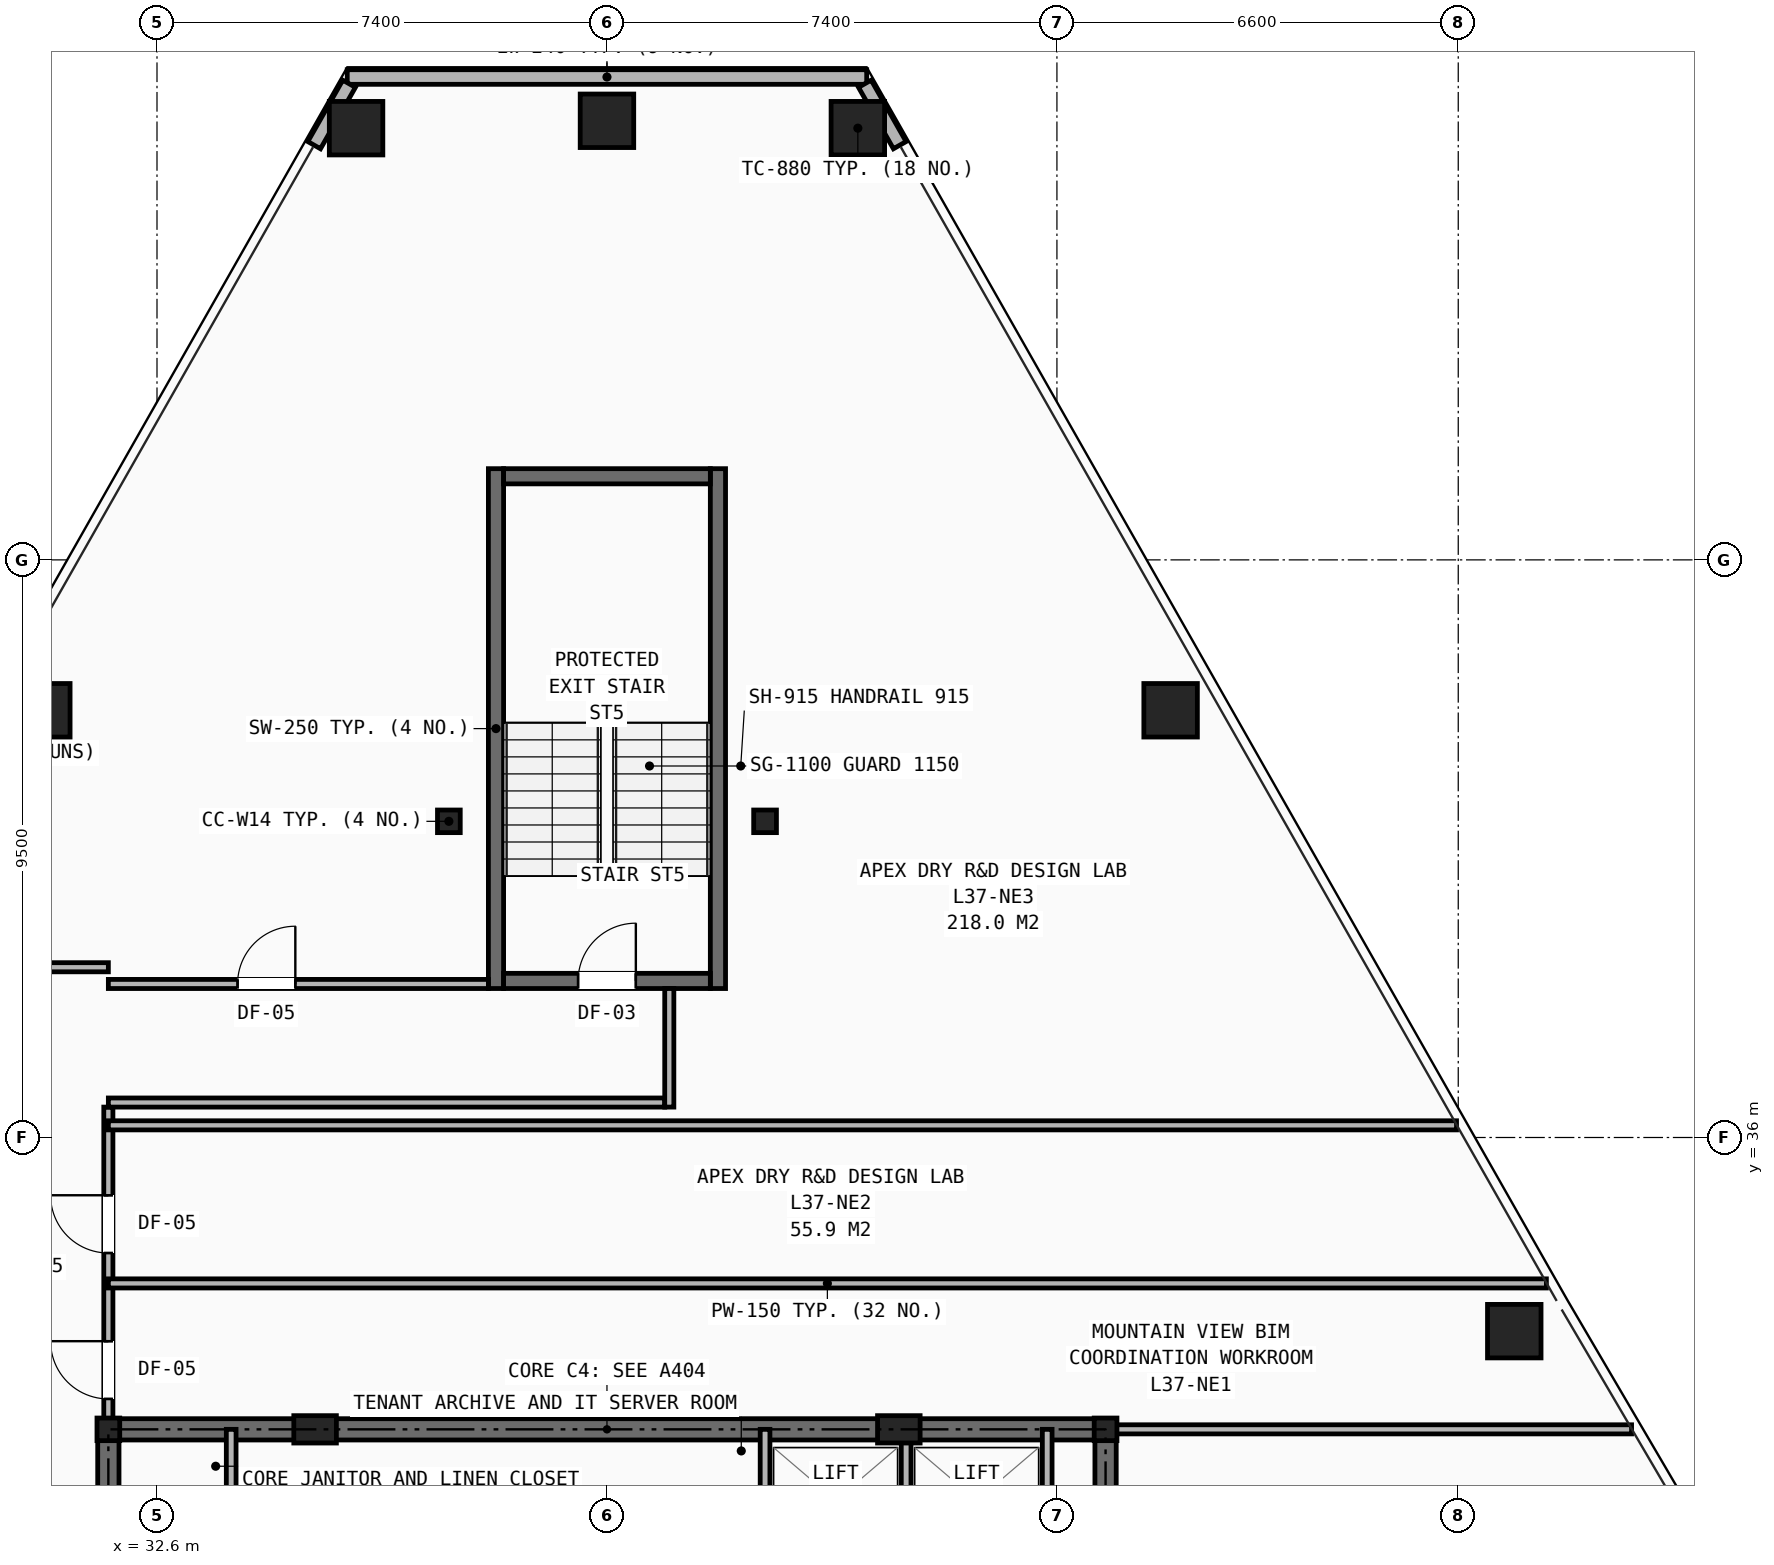
"""IFC4 building model, lengths in metres.
Left out: names, types, materials, properties, quantities, classifications, styles, units other than length and angle.
Written with IfcOpenShell. Run it as: python <this file> out.ifc"""

import sys

from ifc_helpers import new_model, si_unit, direction, frame, frame_2d, origin, origin_2d, place, context, subcontext, project, spatial, rectangle, hollow_rectangle, i_section, extrude, element, fill, save


model = new_model("IFC4")
c1 = context("Model", 3, precision=1e-05, world=origin(), true_north=direction((0.0, 1.0)))
c2 = subcontext(c1, "Body", "Model", "MODEL_VIEW")
j1 = project(units=[si_unit("LENGTHUNIT", "METRE"), si_unit("PLANEANGLEUNIT", "RADIAN")], contexts=[c1])
p1 = place(None, origin())
s1 = spatial("IfcSite", under=j1, at=p1, CompositionType="ELEMENT")
p2 = place(p1, origin())
s2 = spatial("IfcBuilding", under=s1, at=p2, CompositionType="ELEMENT")
p3 = place(p2, frame((0.0, 0.0, 129.8)))
s3 = spatial("IfcBuildingStorey", under=s2, at=p3, CompositionType="ELEMENT", Elevation=129.8)
for number, where, z_axis, x_axis in (
    (1, (31.8, 31.2, 0.0), (0.0, 0.0, 1.0), (1.0, 0.0, 0.0)),
    (2, (48.2, 31.2, 0.0), (0.0, 0.0, 1.0), (1.0, 0.0, 0.0)),
    (3, (37.4, 41.2, 0.0), (0.0, 0.0, 1.0), (1.0, 0.0, 0.0)),
    (4, (42.6, 41.2, 0.0), (0.0, 0.0, 1.0), (1.0, 0.0, 0.0)),
):
    element("IfcColumn", number, at=place(p3, frame(where, z_axis=z_axis, x_axis=x_axis)), inside=s3, PredefinedType="COLUMN", context=c2, shape_type="SweptSolid", body=[
        extrude(i_section(OverallWidth=0.374, OverallDepth=0.372, WebThickness=0.016, FlangeThickness=0.026, at=origin_2d()), origin(), (0.0, 0.0, 1.0), 3.45),
    ])
for number, where, z_axis, x_axis in (
    (5, (35.2, 31.2, 0.0), (0.0, 0.0, 1.0), (1.0, 0.0, 0.0)),
    (6, (44.8, 31.2, 0.0), (0.0, 0.0, 1.0), (1.0, 0.0, 0.0)),
):
    element("IfcColumn", number, at=place(p3, frame(where, z_axis=z_axis, x_axis=x_axis)), inside=s3, PredefinedType="PILASTER", context=c2, shape_type="SweptSolid", body=[
        extrude(rectangle(XDim=0.7, YDim=0.45, at=origin_2d()), origin(), (0.0, 0.0, 1.0), 3.45),
    ])
for number, where, z_axis, x_axis in (
    (7, (44.126, 52.6, 0.0), (0.0, 0.0, 1.0), (1.0, 0.0, 0.0)),
    (8, (40.0, 52.722, 0.0), (0.0, 0.0, 1.0), (1.0, 0.0, 0.0)),
    (9, (35.874, 52.6, 0.0), (0.0, 0.0, 1.0), (1.0, 0.0, 0.0)),
    (10, (30.73, 43.026, 0.0), (0.0, 0.0, 1.0), (1.0, 0.0, 0.0)),
    (11, (54.921, 32.815, 0.0), (0.0, 0.0, 1.0), (1.0, 0.0, 0.0)),
    (12, (49.27, 43.026, 0.0), (0.0, 0.0, 1.0), (1.0, 0.0, 0.0)),
):
    element("IfcColumn", number, at=place(p3, frame(where, z_axis=z_axis, x_axis=x_axis)), inside=s3, PredefinedType="COLUMN", context=c2, shape_type="SweptSolid", body=[
        extrude(hollow_rectangle(XDim=0.88, YDim=0.88, WallThickness=0.06, at=origin_2d()), origin(), (0.0, 0.0, 1.0), 3.45),
    ])
p4 = place(p3, frame((35.729, 53.442, 0.0), z_axis=(0.0, 0.0, 1.0), x_axis=(1.0, 0.0, 0.0)))
e13 = element("IfcWall", 13, at=p4, inside=s3, PredefinedType="SHEAR", context=c2, shape_type="SweptSolid", body=[
    extrude(rectangle(XDim=8.543, YDim=0.24, at=frame_2d((4.271, 0.0))), origin(), (0.0, 0.0, 1.0), 2.583),
])
for number, where, z_axis, x_axis in (
    (14, (35.759, 53.331, 0.0), (0.0, 0.0, 1.0), (-0.494, -0.869, 0.0)),
    (15, (44.815, 52.321, 0.0), (0.0, 0.0, 1.0), (-0.494, 0.869, 0.0)),
):
    element("IfcWall", number, at=place(p3, frame(where, z_axis=z_axis, x_axis=x_axis)), inside=s3, PredefinedType="SHEAR", context=c2, shape_type="SweptSolid", body=[
        extrude(rectangle(XDim=1.162, YDim=0.24, at=frame_2d((0.581, 0.0))), origin(), (0.0, 0.0, 1.0), 2.583),
    ])
p5 = place(p3, frame((31.8, 31.2, 0.0), z_axis=(0.0, 0.0, 1.0), x_axis=(1.0, 0.0, 0.0)))
e16 = element("IfcWall", 16, at=p5, inside=s3, PredefinedType="SHEAR", context=c2, shape_type="SweptSolid", body=[
    extrude(rectangle(XDim=16.4, YDim=0.35, at=frame_2d((8.2, 0.0))), origin(), (0.0, 0.0, 1.0), 3.21),
])
p6 = place(p3, frame((31.8, 16.4, 0.0), z_axis=(0.0, 0.0, 1.0), x_axis=(0.0, 1.0, 0.0)))
e17 = element("IfcWall", 17, at=p6, inside=s3, PredefinedType="SHEAR", context=c2, shape_type="SweptSolid", body=[
    extrude(rectangle(XDim=14.8, YDim=0.35, at=frame_2d((7.4, 0.0))), origin(), (0.0, 0.0, 1.0), 3.21),
])
p7 = place(p6, frame((11.0, 0.0, 0.0)))
e18 = element("IfcOpeningElement", 18, at=p7, cuts=e17, PredefinedType="OPENING", context=c2, shape_type="SweptSolid", body=[
    extrude(rectangle(XDim=1.1, YDim=2.15, at=frame_2d((0.55, 1.075))), frame((0.0, 0.185, 0.0), z_axis=(0.0, -1.0, 0.0), x_axis=(1.0, 0.0, 0.0)), (0.0, 0.0, 1.0), 0.37),
])
p8 = place(p3, frame((48.2, 16.4, 0.0), z_axis=(0.0, 0.0, 1.0), x_axis=(0.0, 1.0, 0.0)))
e19 = element("IfcWall", 19, at=p8, inside=s3, PredefinedType="SHEAR", context=c2, shape_type="SweptSolid", body=[
    extrude(rectangle(XDim=14.8, YDim=0.35, at=frame_2d((7.4, 0.0))), origin(), (0.0, 0.0, 1.0), 3.21),
])
p9 = place(p8, frame((11.0, 0.0, 0.0)))
e20 = element("IfcOpeningElement", 20, at=p9, cuts=e19, PredefinedType="OPENING", context=c2, shape_type="SweptSolid", body=[
    extrude(rectangle(XDim=1.1, YDim=2.15, at=frame_2d((0.55, 1.075))), frame((0.0, 0.185, 0.0), z_axis=(0.0, -1.0, 0.0), x_axis=(1.0, 0.0, 0.0)), (0.0, 0.0, 1.0), 0.37),
])
for number, where, z_axis, x_axis in (
    (21, (33.82, 29.02, 0.0), (0.0, 0.0, 1.0), (0.0, 1.0, 0.0)),
    (22, (42.6, 29.02, 0.0), (0.0, 0.0, 1.0), (0.0, 1.0, 0.0)),
    (23, (44.92, 29.02, 0.0), (0.0, 0.0, 1.0), (0.0, 1.0, 0.0)),
    (24, (47.24, 29.02, 0.0), (0.0, 0.0, 1.0), (0.0, 1.0, 0.0)),
):
    element("IfcWall", number, at=place(p3, frame(where, z_axis=z_axis, x_axis=x_axis)), inside=s3, PredefinedType="SOLIDWALL", context=c2, shape_type="SweptSolid", body=[
        extrude(rectangle(XDim=2.18, YDim=0.16, at=frame_2d((1.09, 0.0))), origin(), (0.0, 0.0, 1.0), 2.661),
    ])
p10 = place(p3, frame((31.8, 31.2, 0.0), z_axis=(0.0, 0.0, 1.0), x_axis=(0.0, 1.0, 0.0)))
e25 = element("IfcWall", 25, at=p10, inside=s3, PredefinedType="PARTITIONING", context=c2, shape_type="SweptSolid", body=[
    extrude(rectangle(XDim=5.3, YDim=0.15, at=frame_2d((2.65, 0.0))), origin(), (0.0, 0.0, 1.0), 2.252),
])
p11 = place(p10, frame((0.5, 0.0, 0.0)))
e26 = element("IfcOpeningElement", 26, at=p11, cuts=e25, PredefinedType="OPENING", context=c2, shape_type="SweptSolid", body=[
    extrude(rectangle(XDim=0.95, YDim=2.1, at=frame_2d((0.475, 1.05))), frame((0.0, 0.085, 0.0), z_axis=(0.0, -1.0, 0.0), x_axis=(1.0, 0.0, 0.0)), (0.0, 0.0, 1.0), 0.17),
])
p12 = place(p10, frame((2.9, 0.0, 0.0)))
e27 = element("IfcOpeningElement", 27, at=p12, cuts=e25, PredefinedType="OPENING", context=c2, shape_type="SweptSolid", body=[
    extrude(rectangle(XDim=0.95, YDim=2.1, at=frame_2d((0.475, 1.05))), frame((0.0, 0.085, 0.0), z_axis=(0.0, -1.0, 0.0), x_axis=(1.0, 0.0, 0.0)), (0.0, 0.0, 1.0), 0.17),
])
p13 = place(p3, frame((29.6, 38.8, 0.0), z_axis=(0.0, 0.0, 1.0), x_axis=(1.0, 0.0, 0.0)))
e28 = element("IfcWall", 28, at=p13, inside=s3, PredefinedType="PARTITIONING", context=c2, shape_type="SweptSolid", body=[
    extrude(rectangle(XDim=2.2, YDim=0.15, at=frame_2d((1.1, 0.0))), origin(), (0.0, 0.0, 1.0), 2.743),
])
p14 = place(p3, frame((48.2, 31.2, 0.0), z_axis=(0.0, 0.0, 1.0), x_axis=(1.0, 0.0, 0.0)))
e29 = element("IfcWall", 29, at=p14, inside=s3, PredefinedType="PARTITIONING", context=c2, shape_type="SweptSolid", body=[
    extrude(rectangle(XDim=8.65, YDim=0.15, at=frame_2d((4.325, 0.0))), origin(), (0.0, 0.0, 1.0), 2.252),
])
p15 = place(p3, frame((31.8, 33.6, 0.0), z_axis=(0.0, 0.0, 1.0), x_axis=(1.0, 0.0, 0.0)))
e30 = element("IfcWall", 30, at=p15, inside=s3, PredefinedType="PARTITIONING", context=c2, shape_type="SweptSolid", body=[
    extrude(rectangle(XDim=23.649, YDim=0.15, at=frame_2d((11.825, 0.0))), origin(), (0.0, 0.0, 1.0), 2.589),
])
p16 = place(p3, frame((31.8, 36.2, 0.0), z_axis=(0.0, 0.0, 1.0), x_axis=(1.0, 0.0, 0.0)))
e31 = element("IfcWall", 31, at=p16, inside=s3, PredefinedType="PARTITIONING", context=c2, shape_type="SweptSolid", body=[
    extrude(rectangle(XDim=22.172, YDim=0.15, at=frame_2d((11.086, 0.0))), origin(), (0.0, 0.0, 1.0), 2.589),
])
for number, where, z_axis, x_axis in (
    (32, (38.175, 38.45, 0.0), (0.0, 0.0, 1.0), (0.0, 1.0, 0.0)),
    (33, (41.825, 38.45, 0.0), (0.0, 0.0, 1.0), (0.0, 1.0, 0.0)),
):
    element("IfcWall", number, at=place(p3, frame(where, z_axis=z_axis, x_axis=x_axis)), inside=s3, PredefinedType="SHEAR", context=c2, shape_type="SweptSolid", body=[
        extrude(rectangle(XDim=8.55, YDim=0.25, at=frame_2d((4.275, 0.0))), origin(), (0.0, 0.0, 1.0), 3.21),
    ])
p17 = place(p3, frame((38.3, 38.575, 0.0), z_axis=(0.0, 0.0, 1.0), x_axis=(1.0, 0.0, 0.0)))
e34 = element("IfcWall", 34, at=p17, inside=s3, PredefinedType="SHEAR", context=c2, shape_type="SweptSolid", body=[
    extrude(rectangle(XDim=3.4, YDim=0.25, at=frame_2d((1.7, 0.0))), origin(), (0.0, 0.0, 1.0), 3.21),
])
p18 = place(p17, frame((1.225, 0.0, 0.0)))
e35 = element("IfcOpeningElement", 35, at=p18, cuts=e34, PredefinedType="OPENING", context=c2, shape_type="SweptSolid", body=[
    extrude(rectangle(XDim=0.95, YDim=2.1, at=frame_2d((0.475, 1.05))), frame((0.0, 0.135, 0.0), z_axis=(0.0, -1.0, 0.0), x_axis=(1.0, 0.0, 0.0)), (0.0, 0.0, 1.0), 0.27),
])
p19 = place(p3, frame((38.3, 46.875, 0.0), z_axis=(0.0, 0.0, 1.0), x_axis=(1.0, 0.0, 0.0)))
e36 = element("IfcWall", 36, at=p19, inside=s3, PredefinedType="SHEAR", context=c2, shape_type="SweptSolid", body=[
    extrude(rectangle(XDim=3.4, YDim=0.25, at=frame_2d((1.7, 0.0))), origin(), (0.0, 0.0, 1.0), 3.21),
])
p20 = place(p3, frame((31.8, 36.575, 0.0), z_axis=(0.0, 0.0, 1.0), x_axis=(1.0, 0.0, 0.0)))
e37 = element("IfcWall", 37, at=p20, inside=s3, PredefinedType="PARTITIONING", context=c2, shape_type="SweptSolid", body=[
    extrude(rectangle(XDim=9.15, YDim=0.15, at=frame_2d((4.575, 0.0))), origin(), (0.0, 0.0, 1.0), 3.21),
])
p21 = place(p3, frame((31.8, 38.525, 0.0), z_axis=(0.0, 0.0, 1.0), x_axis=(1.0, 0.0, 0.0)))
e38 = element("IfcWall", 38, at=p21, inside=s3, PredefinedType="PARTITIONING", context=c2, shape_type="SweptSolid", body=[
    extrude(rectangle(XDim=6.25, YDim=0.15, at=frame_2d((3.125, 0.0))), origin(), (0.0, 0.0, 1.0), 2.743),
])
p22 = place(p21, frame((2.125, 0.0, 0.0)))
e39 = element("IfcOpeningElement", 39, at=p22, cuts=e38, PredefinedType="OPENING", context=c2, shape_type="SweptSolid", body=[
    extrude(rectangle(XDim=0.95, YDim=2.1, at=frame_2d((0.475, 1.05))), frame((0.0, 0.085, 0.0), z_axis=(0.0, -1.0, 0.0), x_axis=(1.0, 0.0, 0.0)), (0.0, 0.0, 1.0), 0.17),
])
p23 = place(p3, frame((41.025, 36.5, 0.0), z_axis=(0.0, 0.0, 1.0), x_axis=(0.0, 1.0, 0.0)))
e40 = element("IfcWall", 40, at=p23, inside=s3, PredefinedType="PARTITIONING", context=c2, shape_type="SweptSolid", body=[
    extrude(rectangle(XDim=1.95, YDim=0.15, at=frame_2d((0.975, 0.0))), origin(), (0.0, 0.0, 1.0), 3.21),
])
p24 = place(p11, origin())
e41 = element("IfcDoor", 41, at=p24, inside=s3, OperationType="SINGLE_SWING_RIGHT", PredefinedType="DOOR", context=c2, shape_type="SweptSolid", body=[
    extrude(rectangle(XDim=0.95, YDim=2.1, at=frame_2d((0.475, 1.05))), frame((0.0, 0.025, 0.0), z_axis=(0.0, -1.0, 0.0), x_axis=(1.0, 0.0, 0.0)), (0.0, 0.0, 1.0), 0.05),
])
fill(e26, e41)
p25 = place(p12, origin())
e42 = element("IfcDoor", 42, at=p25, inside=s3, OperationType="SINGLE_SWING_RIGHT", PredefinedType="DOOR", context=c2, shape_type="SweptSolid", body=[
    extrude(rectangle(XDim=0.95, YDim=2.1, at=frame_2d((0.475, 1.05))), frame((0.0, 0.025, 0.0), z_axis=(0.0, -1.0, 0.0), x_axis=(1.0, 0.0, 0.0)), (0.0, 0.0, 1.0), 0.05),
])
fill(e27, e42)
p26 = place(p22, origin())
e43 = element("IfcDoor", 43, at=p26, inside=s3, OperationType="SINGLE_SWING_RIGHT", PredefinedType="DOOR", context=c2, shape_type="SweptSolid", body=[
    extrude(rectangle(XDim=0.95, YDim=2.1, at=frame_2d((0.475, 1.05))), frame((0.0, 0.025, 0.0), z_axis=(0.0, -1.0, 0.0), x_axis=(1.0, 0.0, 0.0)), (0.0, 0.0, 1.0), 0.05),
])
fill(e39, e43)
p27 = place(p18, origin())
e44 = element("IfcDoor", 44, at=p27, inside=s3, OperationType="SINGLE_SWING_RIGHT", PredefinedType="DOOR", context=c2, shape_type="SweptSolid", body=[
    extrude(rectangle(XDim=0.95, YDim=2.1, at=frame_2d((0.475, 1.05))), frame((0.0, 0.025, 0.0), z_axis=(0.0, -1.0, 0.0), x_axis=(1.0, 0.0, 0.0)), (0.0, 0.0, 1.0), 0.05),
])
fill(e35, e44)
save(model, sys.argv[1])
